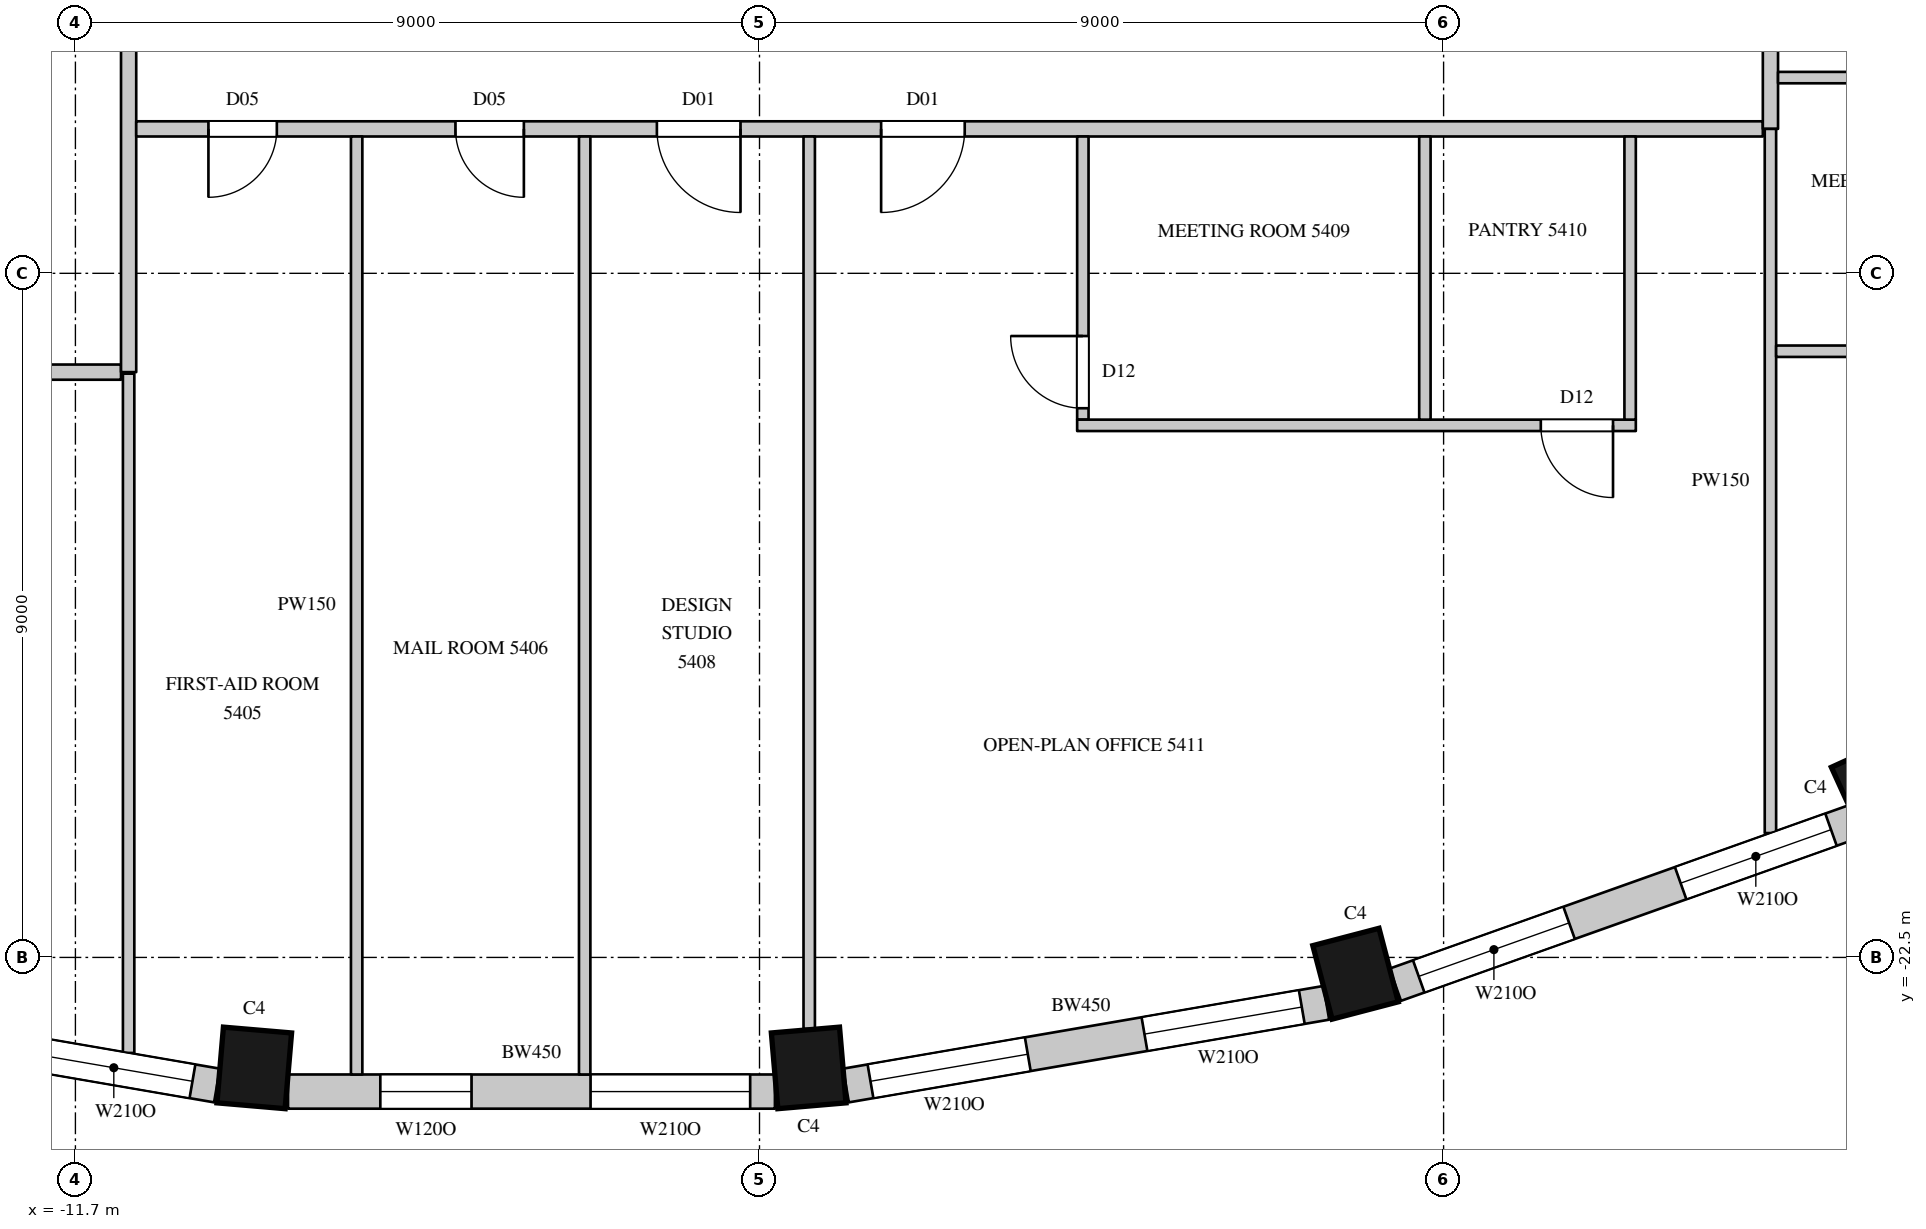
"""IFC4 building model, lengths in metres.
Left out: names, types, materials, properties, quantities, classifications, styles, units other than length and angle.
Written with IfcOpenShell. Run it as: python <this file> out.ifc"""

import sys

from ifc_helpers import new_model, si_unit, direction, frame, frame_2d, origin, origin_2d, place, context, subcontext, project, spatial, rectangle, extrude, element, fill, save


model = new_model("IFC4")
c1 = context("Model", 3, precision=1e-05, world=origin(), true_north=direction((0.0, 1.0)))
c2 = subcontext(c1, "Body", "Model", "MODEL_VIEW")
j1 = project(units=[si_unit("LENGTHUNIT", "METRE"), si_unit("PLANEANGLEUNIT", "RADIAN")], contexts=[c1])
p1 = place(None, origin())
s1 = spatial("IfcSite", under=j1, at=p1, CompositionType="ELEMENT")
p2 = place(p1, origin())
s2 = spatial("IfcBuilding", under=s1, at=p2, CompositionType="ELEMENT")
p3 = place(p2, frame((0.0, 0.0, 243.4)))
s3 = spatial("IfcBuildingStorey", under=s2, at=p3, CompositionType="ELEMENT", Elevation=243.4)
for number, where, z_axis, x_axis in (
    (1, (-9.347, -23.954, 0.0), (0.0, 0.0, 1.0), (0.996, -0.085, 0.0)),
    (2, (-2.053, -23.954, 0.0), (0.0, 0.0, 1.0), (0.996, 0.085, 0.0)),
    (3, (5.142, -22.715, 0.0), (0.0, 0.0, 1.0), (0.967, 0.253, 0.0)),
    (4, (12.019, -20.267, 0.0), (0.0, 0.0, 1.0), (0.91, 0.415, 0.0)),
):
    element("IfcColumn", number, at=place(p3, frame(where, z_axis=z_axis, x_axis=x_axis)), inside=s3, PredefinedType="COLUMN", context=c2, shape_type="SweptSolid", body=[
        extrude(rectangle(XDim=0.9, YDim=1.0, at=origin_2d()), origin(), (0.0, 0.0, 1.0), 4.1),
    ])
p4 = place(p3, frame((-16.157, -23.097, 0.0), z_axis=(0.0, 0.0, 1.0), x_axis=(0.985502073964, -0.169663379113, 0.0)))
e5 = element("IfcWall", 5, at=p4, inside=s3, PredefinedType="SOLIDWALL", context=c2, shape_type="SweptSolid", body=[
    extrude(rectangle(XDim=6.412, YDim=0.45, at=frame_2d((3.206, 0.0))), origin(), (0.0, 0.0, 1.0), 3.8),
])
p5 = place(p4, frame((0.327, 0.0, 1.05)))
e6 = element("IfcOpeningElement", 6, at=p5, cuts=e5, PredefinedType="OPENING", context=c2, shape_type="SweptSolid", body=[
    extrude(rectangle(XDim=2.1, YDim=2.4, at=frame_2d((1.05, 1.2))), frame((0.0, 0.235, 0.0), z_axis=(0.0, -1.0, 0.0), x_axis=(1.0, 0.0, 0.0)), (0.0, 0.0, 1.0), 0.47),
])
p6 = place(p4, frame((3.985, 0.0, 1.05)))
e7 = element("IfcOpeningElement", 7, at=p6, cuts=e5, PredefinedType="OPENING", context=c2, shape_type="SweptSolid", body=[
    extrude(rectangle(XDim=2.1, YDim=2.4, at=frame_2d((1.05, 1.2))), frame((0.0, 0.235, 0.0), z_axis=(0.0, -1.0, 0.0), x_axis=(1.0, 0.0, 0.0)), (0.0, 0.0, 1.0), 0.47),
])
p7 = place(p3, frame((-8.903, -24.265, 0.0), z_axis=(0.0, 0.0, 1.0), x_axis=(1.0, 0.0, 0.0)))
e8 = element("IfcWall", 8, at=p7, inside=s3, PredefinedType="SOLIDWALL", context=c2, shape_type="SweptSolid", body=[
    extrude(rectangle(XDim=6.406, YDim=0.45, at=frame_2d((3.203, 0.0))), origin(), (0.0, 0.0, 1.0), 3.8),
])
p8 = place(p7, frame((3.98, 0.0, 1.05)))
e9 = element("IfcOpeningElement", 9, at=p8, cuts=e8, PredefinedType="OPENING", context=c2, shape_type="SweptSolid", body=[
    extrude(rectangle(XDim=2.1, YDim=2.4, at=frame_2d((1.05, 1.2))), frame((0.0, 0.235, 0.0), z_axis=(0.0, -1.0, 0.0), x_axis=(1.0, 0.0, 0.0)), (0.0, 0.0, 1.0), 0.47),
])
p9 = place(p7, frame((1.214, 0.0, 1.05)))
e10 = element("IfcOpeningElement", 10, at=p9, cuts=e8, PredefinedType="OPENING", context=c2, shape_type="SweptSolid", body=[
    extrude(rectangle(XDim=1.2, YDim=2.4, at=frame_2d((0.6, 1.2))), frame((0.0, 0.235, 0.0), z_axis=(0.0, -1.0, 0.0), x_axis=(1.0, 0.0, 0.0)), (0.0, 0.0, 1.0), 0.47),
])
p10 = place(p3, frame((-1.562, -24.185, 0.0), z_axis=(0.0, 0.0, 1.0), x_axis=(0.985502073964, 0.169663379113, 0.0)))
e11 = element("IfcWall", 11, at=p10, inside=s3, PredefinedType="SOLIDWALL", context=c2, shape_type="SweptSolid", body=[
    extrude(rectangle(XDim=6.412, YDim=0.45, at=frame_2d((3.206, 0.0))), origin(), (0.0, 0.0, 1.0), 3.8),
])
p11 = place(p10, frame((0.327, 0.0, 1.05)))
e12 = element("IfcOpeningElement", 12, at=p11, cuts=e11, PredefinedType="OPENING", context=c2, shape_type="SweptSolid", body=[
    extrude(rectangle(XDim=2.1, YDim=2.4, at=frame_2d((1.05, 1.2))), frame((0.0, 0.235, 0.0), z_axis=(0.0, -1.0, 0.0), x_axis=(1.0, 0.0, 0.0)), (0.0, 0.0, 1.0), 0.47),
])
p12 = place(p10, frame((3.985, 0.0, 1.05)))
e13 = element("IfcOpeningElement", 13, at=p12, cuts=e11, PredefinedType="OPENING", context=c2, shape_type="SweptSolid", body=[
    extrude(rectangle(XDim=2.1, YDim=2.4, at=frame_2d((1.05, 1.2))), frame((0.0, 0.235, 0.0), z_axis=(0.0, -1.0, 0.0), x_axis=(1.0, 0.0, 0.0)), (0.0, 0.0, 1.0), 0.47),
])
p13 = place(p3, frame((5.665, -22.859, 0.0), z_axis=(0.0, 0.0, 1.0), x_axis=(0.942108340262, 0.335308626803, 0.0)))
e14 = element("IfcWall", 14, at=p13, inside=s3, PredefinedType="SOLIDWALL", context=c2, shape_type="SweptSolid", body=[
    extrude(rectangle(XDim=6.412, YDim=0.45, at=frame_2d((3.206, 0.0))), origin(), (0.0, 0.0, 1.0), 3.8),
])
p14 = place(p13, frame((0.327, 0.0, 1.05)))
e15 = element("IfcOpeningElement", 15, at=p14, cuts=e14, PredefinedType="OPENING", context=c2, shape_type="SweptSolid", body=[
    extrude(rectangle(XDim=2.1, YDim=2.4, at=frame_2d((1.05, 1.2))), frame((0.0, 0.235, 0.0), z_axis=(0.0, -1.0, 0.0), x_axis=(1.0, 0.0, 0.0)), (0.0, 0.0, 1.0), 0.47),
])
p15 = place(p13, frame((3.985, 0.0, 1.05)))
e16 = element("IfcOpeningElement", 16, at=p15, cuts=e14, PredefinedType="OPENING", context=c2, shape_type="SweptSolid", body=[
    extrude(rectangle(XDim=2.1, YDim=2.4, at=frame_2d((1.05, 1.2))), frame((0.0, 0.235, 0.0), z_axis=(0.0, -1.0, 0.0), x_axis=(1.0, 0.0, 0.0)), (0.0, 0.0, 1.0), 0.47),
])
p16 = place(p3, frame((-13.97, -14.8, 0.0), z_axis=(0.0, 0.0, 1.0), x_axis=(1.0, 0.0, 0.0)))
e17 = element("IfcWall", 17, at=p16, inside=s3, PredefinedType="PARTITIONING", context=c2, shape_type="SweptSolid", body=[
    extrude(rectangle(XDim=2.87, YDim=0.2, at=frame_2d((1.435, 0.0))), origin(), (0.0, 0.0, 1.0), 3.8),
])
p17 = place(p3, frame((-11.0, -14.8, 0.0), z_axis=(0.0, 0.0, 1.0), x_axis=(0.0, 1.0, 0.0)))
e18 = element("IfcWall", 18, at=p17, inside=s3, PredefinedType="PARTITIONING", context=c2, shape_type="SweptSolid", body=[
    extrude(rectangle(XDim=29.6, YDim=0.2, at=frame_2d((14.8, 0.0))), origin(), (0.0, 0.0, 1.0), 3.8),
])
p18 = place(p17, frame((14.35, 0.0, 0.0)))
e19 = element("IfcOpeningElement", 19, at=p18, cuts=e18, PredefinedType="OPENING", context=c2, shape_type="SweptSolid", body=[
    extrude(rectangle(XDim=1.5, YDim=2.4, at=frame_2d((0.75, 1.2))), frame((0.0, 0.11, 0.0), z_axis=(0.0, -1.0, 0.0), x_axis=(1.0, 0.0, 0.0)), (0.0, 0.0, 1.0), 0.22),
])
p19 = place(p3, frame((-10.9, -11.6, 0.0), z_axis=(0.0, 0.0, 1.0), x_axis=(1.0, 0.0, 0.0)))
e20 = element("IfcWall", 20, at=p19, inside=s3, PredefinedType="PARTITIONING", context=c2, shape_type="SweptSolid", body=[
    extrude(rectangle(XDim=21.4, YDim=0.2, at=frame_2d((10.7, 0.0))), origin(), (0.0, 0.0, 1.0), 3.8),
])
p20 = place(p19, frame((0.95, 0.0, 0.0)))
e21 = element("IfcOpeningElement", 21, at=p20, cuts=e20, PredefinedType="OPENING", context=c2, shape_type="SweptSolid", body=[
    extrude(rectangle(XDim=0.9, YDim=2.2, at=frame_2d((0.45, 1.1))), frame((0.0, 0.11, 0.0), z_axis=(0.0, -1.0, 0.0), x_axis=(1.0, 0.0, 0.0)), (0.0, 0.0, 1.0), 0.22),
])
p21 = place(p19, frame((4.2, 0.0, 0.0)))
e22 = element("IfcOpeningElement", 22, at=p21, cuts=e20, PredefinedType="OPENING", context=c2, shape_type="SweptSolid", body=[
    extrude(rectangle(XDim=0.9, YDim=2.2, at=frame_2d((0.45, 1.1))), frame((0.0, 0.11, 0.0), z_axis=(0.0, -1.0, 0.0), x_axis=(1.0, 0.0, 0.0)), (0.0, 0.0, 1.0), 0.22),
])
p22 = place(p19, frame((6.85, 0.0, 0.0)))
e23 = element("IfcOpeningElement", 23, at=p22, cuts=e20, PredefinedType="OPENING", context=c2, shape_type="SweptSolid", body=[
    extrude(rectangle(XDim=1.1, YDim=2.4, at=frame_2d((0.55, 1.2))), frame((0.0, 0.11, 0.0), z_axis=(0.0, -1.0, 0.0), x_axis=(1.0, 0.0, 0.0)), (0.0, 0.0, 1.0), 0.22),
])
p23 = place(p19, frame((9.8, 0.0, 0.0)))
e24 = element("IfcOpeningElement", 24, at=p23, cuts=e20, PredefinedType="OPENING", context=c2, shape_type="SweptSolid", body=[
    extrude(rectangle(XDim=1.1, YDim=2.4, at=frame_2d((0.55, 1.2))), frame((0.0, 0.11, 0.0), z_axis=(0.0, -1.0, 0.0), x_axis=(1.0, 0.0, 0.0)), (0.0, 0.0, 1.0), 0.22),
])
p24 = place(p3, frame((10.6, -11.6, 0.0), z_axis=(0.0, 0.0, 1.0), x_axis=(0.0, 1.0, 0.0)))
e25 = element("IfcWall", 25, at=p24, inside=s3, PredefinedType="PARTITIONING", context=c2, shape_type="SweptSolid", body=[
    extrude(rectangle(XDim=23.7, YDim=0.2, at=frame_2d((11.85, 0.0))), origin(), (0.0, 0.0, 1.0), 3.8),
])
p25 = place(p24, frame((9.45, 0.0, 0.0)))
e26 = element("IfcOpeningElement", 26, at=p25, cuts=e25, PredefinedType="OPENING", context=c2, shape_type="SweptSolid", body=[
    extrude(rectangle(XDim=1.5, YDim=2.4, at=frame_2d((0.75, 1.2))), frame((0.0, 0.11, 0.0), z_axis=(0.0, -1.0, 0.0), x_axis=(1.0, 0.0, 0.0)), (0.0, 0.0, 1.0), 0.22),
])
p26 = place(p24, frame((19.45, 0.0, 0.0)))
e27 = element("IfcOpeningElement", 27, at=p26, cuts=e25, PredefinedType="OPENING", context=c2, shape_type="SweptSolid", body=[
    extrude(rectangle(XDim=1.1, YDim=2.4, at=frame_2d((0.55, 1.2))), frame((0.0, 0.11, 0.0), z_axis=(0.0, -1.0, 0.0), x_axis=(1.0, 0.0, 0.0)), (0.0, 0.0, 1.0), 0.22),
])
p27 = place(p24, frame((4.6, 0.0, 0.0)))
e28 = element("IfcOpeningElement", 28, at=p27, cuts=e25, PredefinedType="OPENING", context=c2, shape_type="SweptSolid", body=[
    extrude(rectangle(XDim=1.1, YDim=2.4, at=frame_2d((0.55, 1.2))), frame((0.0, 0.11, 0.0), z_axis=(0.0, -1.0, 0.0), x_axis=(1.0, 0.0, 0.0)), (0.0, 0.0, 1.0), 0.22),
])
p28 = place(p3, frame((-11.0, -23.757, 0.0), z_axis=(0.0, 0.0, 1.0), x_axis=(0.0, 1.0, 0.0)))
e29 = element("IfcWall", 29, at=p28, inside=s3, PredefinedType="PARTITIONING", context=c2, shape_type="SweptSolid", body=[
    extrude(rectangle(XDim=8.937, YDim=0.15, at=frame_2d((4.468, 0.0))), origin(), (0.0, 0.0, 1.0), 3.8),
])
for number, where, z_axis, x_axis in (
    (30, (-8.0, -24.04, 0.0), (0.0, 0.0, 1.0), (0.0, 1.0, 0.0)),
    (31, (-5.0, -24.04, 0.0), (0.0, 0.0, 1.0), (0.0, 1.0, 0.0)),
):
    element("IfcWall", number, at=place(p3, frame(where, z_axis=z_axis, x_axis=x_axis)), inside=s3, PredefinedType="PARTITIONING", context=c2, shape_type="SweptSolid", body=[
        extrude(rectangle(XDim=12.34, YDim=0.15, at=frame_2d((6.17, 0.0))), origin(), (0.0, 0.0, 1.0), 3.8),
    ])
p29 = place(p3, frame((-2.046, -23.441, 0.0), z_axis=(0.0, 0.0, 1.0), x_axis=(0.0, 1.0, 0.0)))
e32 = element("IfcWall", 32, at=p29, inside=s3, PredefinedType="PARTITIONING", context=c2, shape_type="SweptSolid", body=[
    extrude(rectangle(XDim=11.741, YDim=0.15, at=frame_2d((5.871, 0.0))), origin(), (0.0, 0.0, 1.0), 3.8),
])
p30 = place(p3, frame((1.554, -15.425, 0.0), z_axis=(0.0, 0.0, 1.0), x_axis=(0.0, 1.0, 0.0)))
e33 = element("IfcWall", 33, at=p30, inside=s3, PredefinedType="PARTITIONING", context=c2, shape_type="SweptSolid", body=[
    extrude(rectangle(XDim=3.725, YDim=0.15, at=frame_2d((1.863, 0.0))), origin(), (0.0, 0.0, 1.0), 3.8),
])
p31 = place(p30, frame((0.15, 0.0, 0.0)))
e34 = element("IfcOpeningElement", 34, at=p31, cuts=e33, PredefinedType="OPENING", context=c2, shape_type="SweptSolid", body=[
    extrude(rectangle(XDim=0.95, YDim=2.2, at=frame_2d((0.475, 1.1))), frame((0.0, 0.085, 0.0), z_axis=(0.0, -1.0, 0.0), x_axis=(1.0, 0.0, 0.0)), (0.0, 0.0, 1.0), 0.17),
])
p32 = place(p3, frame((1.479, -15.5, 0.0), z_axis=(0.0, 0.0, 1.0), x_axis=(1.0, 0.0, 0.0)))
e35 = element("IfcWall", 35, at=p32, inside=s3, PredefinedType="PARTITIONING", context=c2, shape_type="SweptSolid", body=[
    extrude(rectangle(XDim=7.35, YDim=0.15, at=frame_2d((3.675, 0.0))), origin(), (0.0, 0.0, 1.0), 3.8),
])
p33 = place(p32, frame((6.1, 0.0, 0.0)))
e36 = element("IfcOpeningElement", 36, at=p33, cuts=e35, PredefinedType="OPENING", context=c2, shape_type="SweptSolid", body=[
    extrude(rectangle(XDim=0.95, YDim=2.2, at=frame_2d((0.475, 1.1))), frame((0.0, 0.085, 0.0), z_axis=(0.0, -1.0, 0.0), x_axis=(1.0, 0.0, 0.0)), (0.0, 0.0, 1.0), 0.17),
])
for number, where, z_axis, x_axis in (
    (37, (6.054, -15.425, 0.0), (0.0, 0.0, 1.0), (0.0, 1.0, 0.0)),
    (38, (8.754, -15.425, 0.0), (0.0, 0.0, 1.0), (0.0, 1.0, 0.0)),
):
    element("IfcWall", number, at=place(p3, frame(where, z_axis=z_axis, x_axis=x_axis)), inside=s3, PredefinedType="PARTITIONING", context=c2, shape_type="SweptSolid", body=[
        extrude(rectangle(XDim=3.725, YDim=0.15, at=frame_2d((1.863, 0.0))), origin(), (0.0, 0.0, 1.0), 3.8),
    ])
p34 = place(p3, frame((10.6, -20.864, 0.0), z_axis=(0.0, 0.0, 1.0), x_axis=(0.0, 1.0, 0.0)))
e39 = element("IfcWall", 39, at=p34, inside=s3, PredefinedType="PARTITIONING", context=c2, shape_type="SweptSolid", body=[
    extrude(rectangle(XDim=9.264, YDim=0.15, at=frame_2d((4.632, 0.0))), origin(), (0.0, 0.0, 1.0), 3.8),
])
p35 = place(p3, frame((10.675, -14.525, 0.0), z_axis=(0.0, 0.0, 1.0), x_axis=(1.0, 0.0, 0.0)))
e40 = element("IfcWall", 40, at=p35, inside=s3, PredefinedType="PARTITIONING", context=c2, shape_type="SweptSolid", body=[
    extrude(rectangle(XDim=3.6, YDim=0.15, at=frame_2d((1.8, 0.0))), origin(), (0.0, 0.0, 1.0), 3.8),
])
p36 = place(p35, frame((1.25, 0.0, 0.0)))
e41 = element("IfcOpeningElement", 41, at=p36, cuts=e40, PredefinedType="OPENING", context=c2, shape_type="SweptSolid", body=[
    extrude(rectangle(XDim=0.95, YDim=2.2, at=frame_2d((0.475, 1.1))), frame((0.0, 0.085, 0.0), z_axis=(0.0, -1.0, 0.0), x_axis=(1.0, 0.0, 0.0)), (0.0, 0.0, 1.0), 0.17),
])
p37 = place(p3, frame((10.7, -10.925, 0.0), z_axis=(0.0, 0.0, 1.0), x_axis=(1.0, 0.0, 0.0)))
e42 = element("IfcWall", 42, at=p37, inside=s3, PredefinedType="PARTITIONING", context=c2, shape_type="SweptSolid", body=[
    extrude(rectangle(XDim=3.425, YDim=0.15, at=frame_2d((1.712, 0.0))), origin(), (0.0, 0.0, 1.0), 3.8),
])
p38 = place(p6, origin())
e43 = element("IfcWindow", 43, at=p38, inside=s3, PartitioningType="SINGLE_PANEL", PredefinedType="WINDOW", context=c2, shape_type="SweptSolid", body=[
    extrude(rectangle(XDim=2.1, YDim=2.4, at=frame_2d((1.05, 1.2))), frame((0.0, 0.135, 0.0), z_axis=(0.0, -1.0, 0.0), x_axis=(1.0, 0.0, 0.0)), (0.0, 0.0, 1.0), 0.06),
])
fill(e7, e43)
p39 = place(p8, origin())
e44 = element("IfcWindow", 44, at=p39, inside=s3, PartitioningType="SINGLE_PANEL", PredefinedType="WINDOW", context=c2, shape_type="SweptSolid", body=[
    extrude(rectangle(XDim=2.1, YDim=2.4, at=frame_2d((1.05, 1.2))), frame((0.0, 0.135, 0.0), z_axis=(0.0, -1.0, 0.0), x_axis=(1.0, 0.0, 0.0)), (0.0, 0.0, 1.0), 0.06),
])
fill(e9, e44)
p40 = place(p11, origin())
e45 = element("IfcWindow", 45, at=p40, inside=s3, PartitioningType="SINGLE_PANEL", PredefinedType="WINDOW", context=c2, shape_type="SweptSolid", body=[
    extrude(rectangle(XDim=2.1, YDim=2.4, at=frame_2d((1.05, 1.2))), frame((0.0, 0.135, 0.0), z_axis=(0.0, -1.0, 0.0), x_axis=(1.0, 0.0, 0.0)), (0.0, 0.0, 1.0), 0.06),
])
fill(e12, e45)
p41 = place(p12, origin())
e46 = element("IfcWindow", 46, at=p41, inside=s3, PartitioningType="SINGLE_PANEL", PredefinedType="WINDOW", context=c2, shape_type="SweptSolid", body=[
    extrude(rectangle(XDim=2.1, YDim=2.4, at=frame_2d((1.05, 1.2))), frame((0.0, 0.135, 0.0), z_axis=(0.0, -1.0, 0.0), x_axis=(1.0, 0.0, 0.0)), (0.0, 0.0, 1.0), 0.06),
])
fill(e13, e46)
p42 = place(p14, origin())
e47 = element("IfcWindow", 47, at=p42, inside=s3, PartitioningType="SINGLE_PANEL", PredefinedType="WINDOW", context=c2, shape_type="SweptSolid", body=[
    extrude(rectangle(XDim=2.1, YDim=2.4, at=frame_2d((1.05, 1.2))), frame((0.0, 0.135, 0.0), z_axis=(0.0, -1.0, 0.0), x_axis=(1.0, 0.0, 0.0)), (0.0, 0.0, 1.0), 0.06),
])
fill(e15, e47)
p43 = place(p15, origin())
e48 = element("IfcWindow", 48, at=p43, inside=s3, PartitioningType="SINGLE_PANEL", PredefinedType="WINDOW", context=c2, shape_type="SweptSolid", body=[
    extrude(rectangle(XDim=2.1, YDim=2.4, at=frame_2d((1.05, 1.2))), frame((0.0, 0.135, 0.0), z_axis=(0.0, -1.0, 0.0), x_axis=(1.0, 0.0, 0.0)), (0.0, 0.0, 1.0), 0.06),
])
fill(e16, e48)
p44 = place(p20, origin())
e49 = element("IfcDoor", 49, at=p44, inside=s3, OperationType="SINGLE_SWING_RIGHT", PredefinedType="DOOR", context=c2, shape_type="SweptSolid", body=[
    extrude(rectangle(XDim=0.9, YDim=2.2, at=frame_2d((0.45, 1.1))), frame((0.0, 0.025, 0.0), z_axis=(0.0, -1.0, 0.0), x_axis=(1.0, 0.0, 0.0)), (0.0, 0.0, 1.0), 0.05),
])
fill(e21, e49)
p45 = place(p21, origin())
e50 = element("IfcDoor", 50, at=p45, inside=s3, OperationType="SINGLE_SWING_LEFT", PredefinedType="DOOR", context=c2, shape_type="SweptSolid", body=[
    extrude(rectangle(XDim=0.9, YDim=2.2, at=frame_2d((0.45, 1.1))), frame((0.0, 0.025, 0.0), z_axis=(0.0, -1.0, 0.0), x_axis=(1.0, 0.0, 0.0)), (0.0, 0.0, 1.0), 0.05),
])
fill(e22, e50)
p46 = place(p22, origin())
e51 = element("IfcDoor", 51, at=p46, inside=s3, OperationType="SINGLE_SWING_LEFT", PredefinedType="DOOR", context=c2, shape_type="SweptSolid", body=[
    extrude(rectangle(XDim=1.1, YDim=2.4, at=frame_2d((0.55, 1.2))), frame((0.0, 0.025, 0.0), z_axis=(0.0, -1.0, 0.0), x_axis=(1.0, 0.0, 0.0)), (0.0, 0.0, 1.0), 0.05),
])
fill(e23, e51)
p47 = place(p23, origin())
e52 = element("IfcDoor", 52, at=p47, inside=s3, OperationType="SINGLE_SWING_RIGHT", PredefinedType="DOOR", context=c2, shape_type="SweptSolid", body=[
    extrude(rectangle(XDim=1.1, YDim=2.4, at=frame_2d((0.55, 1.2))), frame((0.0, 0.025, 0.0), z_axis=(0.0, -1.0, 0.0), x_axis=(1.0, 0.0, 0.0)), (0.0, 0.0, 1.0), 0.05),
])
fill(e24, e52)
p48 = place(p31, origin())
e53 = element("IfcDoor", 53, at=p48, inside=s3, OperationType="SINGLE_SWING_RIGHT", PredefinedType="DOOR", context=c2, shape_type="SweptSolid", body=[
    extrude(rectangle(XDim=0.95, YDim=2.2, at=frame_2d((0.475, 1.1))), frame((0.0, 0.025, 0.0), z_axis=(0.0, -1.0, 0.0), x_axis=(1.0, 0.0, 0.0)), (0.0, 0.0, 1.0), 0.05),
])
fill(e34, e53)
p49 = place(p33, origin())
e54 = element("IfcDoor", 54, at=p49, inside=s3, OperationType="SINGLE_SWING_LEFT", PredefinedType="DOOR", context=c2, shape_type="SweptSolid", body=[
    extrude(rectangle(XDim=0.95, YDim=2.2, at=frame_2d((0.475, 1.1))), frame((0.0, 0.025, 0.0), z_axis=(0.0, -1.0, 0.0), x_axis=(1.0, 0.0, 0.0)), (0.0, 0.0, 1.0), 0.05),
])
fill(e36, e54)
p50 = place(p9, origin())
e55 = element("IfcWindow", 55, at=p50, inside=s3, PartitioningType="SINGLE_PANEL", PredefinedType="WINDOW", context=c2, shape_type="SweptSolid", body=[
    extrude(rectangle(XDim=1.2, YDim=2.4, at=frame_2d((0.6, 1.2))), frame((0.0, 0.135, 0.0), z_axis=(0.0, -1.0, 0.0), x_axis=(1.0, 0.0, 0.0)), (0.0, 0.0, 1.0), 0.06),
])
fill(e10, e55)
save(model, sys.argv[1])
